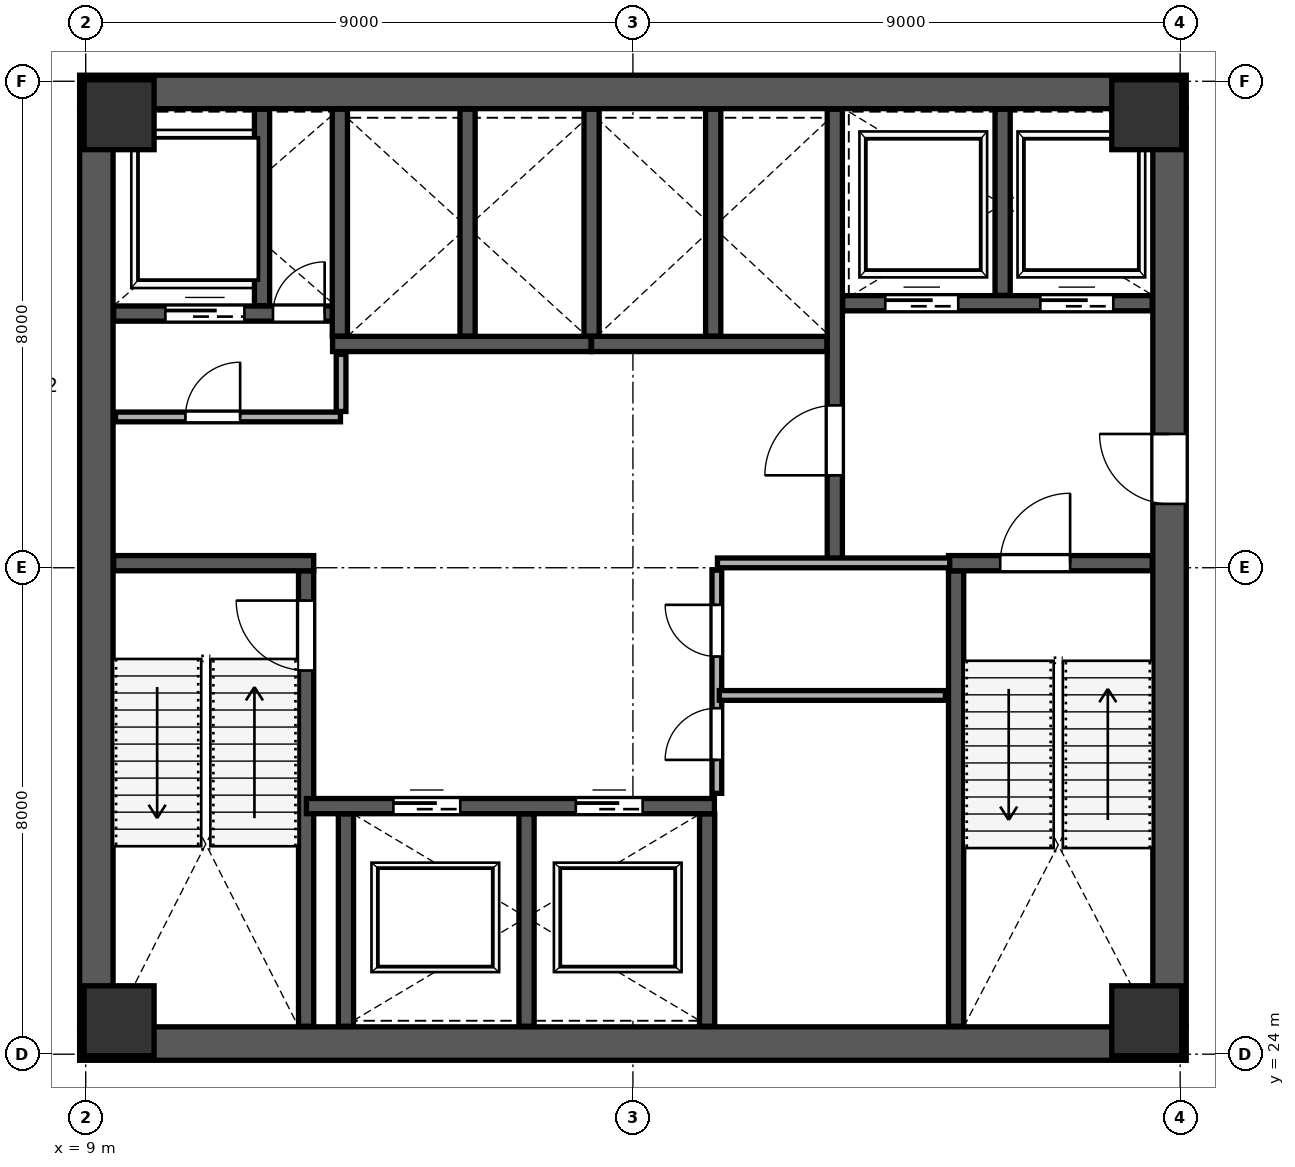
"""IFC4 building model, lengths in metres.
Left out: names, types, materials, properties, quantities, classifications, styles, units other than length and angle.
Written with IfcOpenShell. Run it as: python <this file> out.ifc"""

import sys

from ifc_helpers import new_model, si_unit, direction, frame, frame_2d, origin, origin_2d, place, context, subcontext, project, spatial, rectangle, extrude, source, transform, mapped, element, fill, save


model = new_model("IFC4")
c1 = context("Model", 3, precision=1e-05, world=origin(), true_north=direction((0.0, 1.0)))
c2 = subcontext(c1, "Body", "Model", "MODEL_VIEW")
j1 = project(units=[si_unit("LENGTHUNIT", "METRE"), si_unit("PLANEANGLEUNIT", "RADIAN")], contexts=[c1])
p1 = place(None, origin())
s1 = spatial("IfcSite", under=j1, at=p1, CompositionType="ELEMENT")
p2 = place(p1, origin())
s2 = spatial("IfcBuilding", under=s1, at=p2, CompositionType="ELEMENT")
p3 = place(p2, frame((0.0, 0.0, 104.2)))
s3 = spatial("IfcBuildingStorey", under=s2, at=p3, CompositionType="ELEMENT", Elevation=104.2)
m1 = source(origin(), c2, "Body", "SweptSolid", [
    extrude(rectangle(XDim=1.15, YDim=1.15, at=origin_2d()), origin(), (0.0, 0.0, 1.0), 4.198),
])
for number, where, z_axis, x_axis in (
    (1, (9.55, 24.55, 0.001), (0.0, 0.0, 1.0), (1.0, 0.0, 0.0)),
    (2, (26.45, 24.55, 0.001), (0.0, 0.0, 1.0), (1.0, 0.0, 0.0)),
    (3, (9.55, 39.45, 0.001), (0.0, 0.0, 1.0), (1.0, 0.0, 0.0)),
    (4, (26.45, 39.45, 0.001), (0.0, 0.0, 1.0), (1.0, 0.0, 0.0)),
):
    element("IfcColumn", number, at=place(p3, frame(where, z_axis=z_axis, x_axis=x_axis)), inside=s3, PredefinedType="COLUMN", context=c2, shape_type="MappedRepresentation", body=[
        mapped(m1, transform((0.0, 0.0, 0.0), scale=1.0)),
    ])
p4 = place(p3, frame((9.175, 24.45, 0.0), z_axis=(0.0, 0.0, 1.0), x_axis=(0.0, 1.0, 0.0)))
e5 = element("IfcWall", 5, at=p4, inside=s3, PredefinedType="SHEAR", context=c2, shape_type="SweptSolid", body=[
    extrude(rectangle(XDim=15.1, YDim=0.55, at=frame_2d((7.55, 0.0))), origin(), (0.0, 0.0, 1.0), 3.96),
])
p5 = place(p3, frame((26.825, 24.45, 0.0), z_axis=(0.0, 0.0, 1.0), x_axis=(0.0, 1.0, 0.0)))
e6 = element("IfcWall", 6, at=p5, inside=s3, PredefinedType="SHEAR", context=c2, shape_type="SweptSolid", body=[
    extrude(rectangle(XDim=15.1, YDim=0.55, at=frame_2d((7.55, 0.0))), origin(), (0.0, 0.0, 1.0), 3.96),
])
p6 = place(p5, frame((8.6, 0.0, 0.0)))
e7 = element("IfcOpeningElement", 7, at=p6, cuts=e6, PredefinedType="OPENING", context=c2, shape_type="SweptSolid", body=[
    extrude(rectangle(XDim=1.15, YDim=2.2, at=frame_2d((0.575, 1.1))), frame((0.0, 0.285, 0.0), z_axis=(0.0, -1.0, 0.0), x_axis=(1.0, 0.0, 0.0)), (0.0, 0.0, 1.0), 0.57),
])
for number, where, z_axis, x_axis in (
    (8, (8.9, 24.175, 0.0), (0.0, 0.0, 1.0), (1.0, 0.0, 0.0)),
    (9, (8.9, 39.825, 0.0), (0.0, 0.0, 1.0), (1.0, 0.0, 0.0)),
):
    element("IfcWall", number, at=place(p3, frame(where, z_axis=z_axis, x_axis=x_axis)), inside=s3, PredefinedType="SHEAR", context=c2, shape_type="SweptSolid", body=[
        extrude(rectangle(XDim=18.2, YDim=0.55, at=frame_2d((9.1, 0.0))), origin(), (0.0, 0.0, 1.0), 3.96),
    ])
p7 = place(p3, frame((12.625, 24.46, 0.0), z_axis=(0.0, 0.0, 1.0), x_axis=(0.0, 1.0, 0.0)))
e10 = element("IfcWall", 10, at=p7, inside=s3, PredefinedType="SHEAR", context=c2, shape_type="SweptSolid", body=[
    extrude(rectangle(XDim=7.49, YDim=0.25, at=frame_2d((3.745, 0.0))), origin(), (0.0, 0.0, 1.0), 3.96),
])
p8 = place(p7, frame((5.85, 0.0, 0.0)))
e11 = element("IfcOpeningElement", 11, at=p8, cuts=e10, PredefinedType="OPENING", context=c2, shape_type="SweptSolid", body=[
    extrude(rectangle(XDim=1.15, YDim=2.2, at=frame_2d((0.575, 1.1))), frame((0.0, 0.135, 0.0), z_axis=(0.0, -1.0, 0.0), x_axis=(1.0, 0.0, 0.0)), (0.0, 0.0, 1.0), 0.27),
])
p9 = place(p3, frame((9.46, 32.075, 0.0), z_axis=(0.0, 0.0, 1.0), x_axis=(1.0, 0.0, 0.0)))
e12 = element("IfcWall", 12, at=p9, inside=s3, PredefinedType="SHEAR", context=c2, shape_type="SweptSolid", body=[
    extrude(rectangle(XDim=3.29, YDim=0.25, at=frame_2d((1.645, 0.0))), origin(), (0.0, 0.0, 1.0), 3.96),
])
p10 = place(p3, frame((23.315, 24.46, 0.0), z_axis=(0.0, 0.0, 1.0), x_axis=(0.0, 1.0, 0.0)))
e13 = element("IfcWall", 13, at=p10, inside=s3, PredefinedType="SHEAR", context=c2, shape_type="SweptSolid", body=[
    extrude(rectangle(XDim=7.49, YDim=0.25, at=frame_2d((3.745, 0.0))), origin(), (0.0, 0.0, 1.0), 3.96),
])
p11 = place(p3, frame((23.19, 32.075, 0.0), z_axis=(0.0, 0.0, 1.0), x_axis=(1.0, 0.0, 0.0)))
e14 = element("IfcWall", 14, at=p11, inside=s3, PredefinedType="SHEAR", context=c2, shape_type="SweptSolid", body=[
    extrude(rectangle(XDim=3.35, YDim=0.25, at=frame_2d((1.675, 0.0))), origin(), (0.0, 0.0, 1.0), 3.96),
])
p12 = place(p11, frame((0.85, 0.0, 0.0)))
e15 = element("IfcOpeningElement", 15, at=p12, cuts=e14, PredefinedType="OPENING", context=c2, shape_type="SweptSolid", body=[
    extrude(rectangle(XDim=1.15, YDim=2.2, at=frame_2d((0.575, 1.1))), frame((0.0, 0.135, 0.0), z_axis=(0.0, -1.0, 0.0), x_axis=(1.0, 0.0, 0.0)), (0.0, 0.0, 1.0), 0.27),
])
p13 = place(p3, frame((21.32, 32.12, 0.0), z_axis=(0.0, 0.0, 1.0), x_axis=(0.0, 1.0, 0.0)))
e16 = element("IfcWall", 16, at=p13, inside=s3, PredefinedType="SHEAR", context=c2, shape_type="SweptSolid", body=[
    extrude(rectangle(XDim=7.42, YDim=0.25, at=frame_2d((3.71, 0.0))), origin(), (0.0, 0.0, 1.0), 3.96),
])
p14 = place(p13, frame((1.4, 0.0, 0.0)))
e17 = element("IfcOpeningElement", 17, at=p14, cuts=e16, PredefinedType="OPENING", context=c2, shape_type="SweptSolid", body=[
    extrude(rectangle(XDim=1.15, YDim=2.2, at=frame_2d((0.575, 1.1))), frame((0.0, 0.135, 0.0), z_axis=(0.0, -1.0, 0.0), x_axis=(1.0, 0.0, 0.0)), (0.0, 0.0, 1.0), 0.27),
])
p15 = place(p3, frame((9.46, 36.18, 0.0), z_axis=(0.0, 0.0, 1.0), x_axis=(1.0, 0.0, 0.0)))
e18 = element("IfcWall", 18, at=p15, inside=s3, PredefinedType="SHEAR", context=c2, shape_type="SweptSolid", body=[
    extrude(rectangle(XDim=3.79, YDim=0.25, at=frame_2d((1.895, 0.0))), origin(), (0.0, 0.0, 1.0), 3.96),
])
p16 = place(p15, frame((2.62, 0.0, 0.0)))
e19 = element("IfcOpeningElement", 19, at=p16, cuts=e18, PredefinedType="OPENING", context=c2, shape_type="SweptSolid", body=[
    extrude(rectangle(XDim=0.85, YDim=2.1, at=frame_2d((0.425, 1.05))), frame((0.0, 0.135, 0.0), z_axis=(0.0, -1.0, 0.0), x_axis=(1.0, 0.0, 0.0)), (0.0, 0.0, 1.0), 0.27),
])
p17 = place(p15, frame((0.85, 0.0, 0.0)))
e20 = element("IfcOpeningElement", 20, at=p17, cuts=e18, PredefinedType="OPENING", context=c2, shape_type="SweptSolid", body=[
    extrude(rectangle(XDim=1.3, YDim=2.25, at=frame_2d((0.65, 1.125))), frame((0.0, 0.135, 0.0), z_axis=(0.0, -1.0, 0.0), x_axis=(1.0, 0.0, 0.0)), (0.0, 0.0, 1.0), 0.27),
])
p18 = place(p3, frame((11.9, 36.31, 0.0), z_axis=(0.0, 0.0, 1.0), x_axis=(0.0, 1.0, 0.0)))
e21 = element("IfcWall", 21, at=p18, inside=s3, PredefinedType="SHEAR", context=c2, shape_type="SweptSolid", body=[
    extrude(rectangle(XDim=3.23, YDim=0.25, at=frame_2d((1.615, 0.0))), origin(), (0.0, 0.0, 1.0), 3.96),
])
p19 = place(p3, frame((21.45, 36.35, 0.0), z_axis=(0.0, 0.0, 1.0), x_axis=(1.0, 0.0, 0.0)))
e22 = element("IfcWall", 22, at=p19, inside=s3, PredefinedType="SHEAR", context=c2, shape_type="SweptSolid", body=[
    extrude(rectangle(XDim=5.09, YDim=0.25, at=frame_2d((2.545, 0.0))), origin(), (0.0, 0.0, 1.0), 3.96),
])
p20 = place(p19, frame((0.7, 0.0, 0.0)))
e23 = element("IfcOpeningElement", 23, at=p20, cuts=e22, PredefinedType="OPENING", context=c2, shape_type="SweptSolid", body=[
    extrude(rectangle(XDim=1.2, YDim=2.2, at=frame_2d((0.6, 1.1))), frame((0.0, 0.135, 0.0), z_axis=(0.0, -1.0, 0.0), x_axis=(1.0, 0.0, 0.0)), (0.0, 0.0, 1.0), 0.27),
])
p21 = place(p19, frame((3.25, 0.0, 0.0)))
e24 = element("IfcOpeningElement", 24, at=p21, cuts=e22, PredefinedType="OPENING", context=c2, shape_type="SweptSolid", body=[
    extrude(rectangle(XDim=1.2, YDim=2.2, at=frame_2d((0.6, 1.1))), frame((0.0, 0.135, 0.0), z_axis=(0.0, -1.0, 0.0), x_axis=(1.0, 0.0, 0.0)), (0.0, 0.0, 1.0), 0.27),
])
p22 = place(p3, frame((24.08, 36.48, 0.0), z_axis=(0.0, 0.0, 1.0), x_axis=(0.0, 1.0, 0.0)))
e25 = element("IfcWall", 25, at=p22, inside=s3, PredefinedType="SHEAR", context=c2, shape_type="SweptSolid", body=[
    extrude(rectangle(XDim=3.06, YDim=0.25, at=frame_2d((1.53, 0.0))), origin(), (0.0, 0.0, 1.0), 3.96),
])
p23 = place(p3, frame((12.63, 28.08, 0.0), z_axis=(0.0, 0.0, 1.0), x_axis=(1.0, 0.0, 0.0)))
e26 = element("IfcWall", 26, at=p23, inside=s3, PredefinedType="SHEAR", context=c2, shape_type="SweptSolid", body=[
    extrude(rectangle(XDim=6.71, YDim=0.25, at=frame_2d((3.355, 0.0))), origin(), (0.0, 0.0, 1.0), 3.96),
])
p24 = place(p23, frame((1.43, 0.0, 0.0)))
e27 = element("IfcOpeningElement", 27, at=p24, cuts=e26, PredefinedType="OPENING", context=c2, shape_type="SweptSolid", body=[
    extrude(rectangle(XDim=1.1, YDim=2.2, at=frame_2d((0.55, 1.1))), frame((0.0, 0.135, 0.0), z_axis=(0.0, -1.0, 0.0), x_axis=(1.0, 0.0, 0.0)), (0.0, 0.0, 1.0), 0.27),
])
p25 = place(p23, frame((4.43, 0.0, 0.0)))
e28 = element("IfcOpeningElement", 28, at=p25, cuts=e26, PredefinedType="OPENING", context=c2, shape_type="SweptSolid", body=[
    extrude(rectangle(XDim=1.1, YDim=2.2, at=frame_2d((0.55, 1.1))), frame((0.0, 0.135, 0.0), z_axis=(0.0, -1.0, 0.0), x_axis=(1.0, 0.0, 0.0)), (0.0, 0.0, 1.0), 0.27),
])
for number, where, z_axis, x_axis in (
    (29, (13.28, 24.46, 0.0), (0.0, 0.0, 1.0), (0.0, 1.0, 0.0)),
    (30, (16.25, 24.46, 0.0), (0.0, 0.0, 1.0), (0.0, 1.0, 0.0)),
    (31, (19.22, 24.46, 0.0), (0.0, 0.0, 1.0), (0.0, 1.0, 0.0)),
):
    element("IfcWall", number, at=place(p3, frame(where, z_axis=z_axis, x_axis=x_axis)), inside=s3, PredefinedType="SHEAR", context=c2, shape_type="SweptSolid", body=[
        extrude(rectangle(XDim=3.49, YDim=0.25, at=frame_2d((1.745, 0.0))), origin(), (0.0, 0.0, 1.0), 3.96),
    ])
p26 = place(p3, frame((13.06, 35.68, 0.0), z_axis=(0.0, 0.0, 1.0), x_axis=(1.0, 0.0, 0.0)))
e32 = element("IfcWall", 32, at=p26, inside=s3, PredefinedType="SHEAR", context=c2, shape_type="SweptSolid", body=[
    extrude(rectangle(XDim=4.25, YDim=0.25, at=frame_2d((2.125, 0.0))), origin(), (0.0, 0.0, 1.0), 3.96),
])
for number, where, z_axis, x_axis in (
    (33, (13.18, 35.81, 0.0), (0.0, 0.0, 1.0), (0.0, 1.0, 0.0)),
    (34, (15.28, 35.81, 0.0), (0.0, 0.0, 1.0), (0.0, 1.0, 0.0)),
):
    element("IfcWall", number, at=place(p3, frame(where, z_axis=z_axis, x_axis=x_axis)), inside=s3, PredefinedType="SHEAR", context=c2, shape_type="SweptSolid", body=[
        extrude(rectangle(XDim=3.73, YDim=0.25, at=frame_2d((1.865, 0.0))), origin(), (0.0, 0.0, 1.0), 3.96),
    ])
p27 = place(p3, frame((17.32, 35.68, 0.0), z_axis=(0.0, 0.0, 1.0), x_axis=(1.0, 0.0, 0.0)))
e35 = element("IfcWall", 35, at=p27, inside=s3, PredefinedType="SHEAR", context=c2, shape_type="SweptSolid", body=[
    extrude(rectangle(XDim=3.87, YDim=0.25, at=frame_2d((1.935, 0.0))), origin(), (0.0, 0.0, 1.0), 3.96),
])
for number, where, z_axis, x_axis in (
    (36, (17.32, 35.81, 0.0), (0.0, 0.0, 1.0), (0.0, 1.0, 0.0)),
    (37, (19.32, 35.81, 0.0), (0.0, 0.0, 1.0), (0.0, 1.0, 0.0)),
):
    element("IfcWall", number, at=place(p3, frame(where, z_axis=z_axis, x_axis=x_axis)), inside=s3, PredefinedType="SHEAR", context=c2, shape_type="SweptSolid", body=[
        extrude(rectangle(XDim=3.73, YDim=0.25, at=frame_2d((1.865, 0.0))), origin(), (0.0, 0.0, 1.0), 3.96),
    ])
p28 = place(p3, frame((9.49, 34.48, 0.0), z_axis=(0.0, 0.0, 1.0), x_axis=(1.0, 0.0, 0.0)))
e38 = element("IfcWall", 38, at=p28, inside=s3, PredefinedType="PARTITIONING", context=c2, shape_type="SweptSolid", body=[
    extrude(rectangle(XDim=3.7, YDim=0.16, at=frame_2d((1.85, 0.0))), origin(), (0.0, 0.0, 1.0), 3.96),
])
p29 = place(p28, frame((1.15, 0.0, 0.0)))
e39 = element("IfcOpeningElement", 39, at=p29, cuts=e38, PredefinedType="OPENING", context=c2, shape_type="SweptSolid", body=[
    extrude(rectangle(XDim=0.9, YDim=2.15, at=frame_2d((0.45, 1.075))), frame((0.0, 0.09, 0.0), z_axis=(0.0, -1.0, 0.0), x_axis=(1.0, 0.0, 0.0)), (0.0, 0.0, 1.0), 0.18),
])
p30 = place(p3, frame((13.2, 34.57, 0.0), z_axis=(0.0, 0.0, 1.0), x_axis=(0.0, 1.0, 0.0)))
e40 = element("IfcWall", 40, at=p30, inside=s3, PredefinedType="PARTITIONING", context=c2, shape_type="SweptSolid", body=[
    extrude(rectangle(XDim=0.94, YDim=0.16, at=frame_2d((0.47, 0.0))), origin(), (0.0, 0.0, 1.0), 3.96),
])
p31 = place(p3, frame((19.39, 32.08, 0.0), z_axis=(0.0, 0.0, 1.0), x_axis=(1.0, 0.0, 0.0)))
e41 = element("IfcWall", 41, at=p31, inside=s3, PredefinedType="PARTITIONING", context=c2, shape_type="SweptSolid", body=[
    extrude(rectangle(XDim=3.82, YDim=0.16, at=frame_2d((1.91, 0.0))), origin(), (0.0, 0.0, 1.0), 3.96),
])
p32 = place(p3, frame((19.38, 28.29, 0.0), z_axis=(0.0, 0.0, 1.0), x_axis=(0.0, 1.0, 0.0)))
e42 = element("IfcWall", 42, at=p32, inside=s3, PredefinedType="PARTITIONING", context=c2, shape_type="SweptSolid", body=[
    extrude(rectangle(XDim=3.67, YDim=0.16, at=frame_2d((1.835, 0.0))), origin(), (0.0, 0.0, 1.0), 3.96),
])
p33 = place(p32, frame((0.55, 0.0, 0.0)))
e43 = element("IfcOpeningElement", 43, at=p33, cuts=e42, PredefinedType="OPENING", context=c2, shape_type="SweptSolid", body=[
    extrude(rectangle(XDim=0.85, YDim=2.1, at=frame_2d((0.425, 1.05))), frame((0.0, 0.09, 0.0), z_axis=(0.0, -1.0, 0.0), x_axis=(1.0, 0.0, 0.0)), (0.0, 0.0, 1.0), 0.18),
])
p34 = place(p32, frame((2.25, 0.0, 0.0)))
e44 = element("IfcOpeningElement", 44, at=p34, cuts=e42, PredefinedType="OPENING", context=c2, shape_type="SweptSolid", body=[
    extrude(rectangle(XDim=0.85, YDim=2.1, at=frame_2d((0.425, 1.05))), frame((0.0, 0.09, 0.0), z_axis=(0.0, -1.0, 0.0), x_axis=(1.0, 0.0, 0.0)), (0.0, 0.0, 1.0), 0.18),
])
p35 = place(p3, frame((19.42, 29.9, 0.0), z_axis=(0.0, 0.0, 1.0), x_axis=(1.0, 0.0, 0.0)))
e45 = element("IfcWall", 45, at=p35, inside=s3, PredefinedType="PARTITIONING", context=c2, shape_type="SweptSolid", body=[
    extrude(rectangle(XDim=3.72, YDim=0.16, at=frame_2d((1.86, 0.0))), origin(), (0.0, 0.0, 1.0), 3.96),
])
p36 = place(p3, frame((8.071, 46.831, 0.0), z_axis=(0.0, 0.0, 1.0), x_axis=(0.965925848141, -0.258818963551, 0.0)))
e46 = element("IfcWall", 46, at=p36, inside=s3, PredefinedType="PARTITIONING", context=c2, shape_type="SweptSolid", body=[
    extrude(rectangle(XDim=26.16, YDim=0.115, at=frame_2d((13.08, 0.0))), origin(), (0.0, 0.0, 1.0), 3.96),
])
p37 = place(p36, frame((1.05, 0.0, 0.0)))
e47 = element("IfcOpeningElement", 47, at=p37, cuts=e46, PredefinedType="OPENING", context=c2, shape_type="SweptSolid", body=[
    extrude(rectangle(XDim=0.95, YDim=2.15, at=frame_2d((0.475, 1.075))), frame((0.0, 0.067, 0.0), z_axis=(0.0, -1.0, 0.0), x_axis=(1.0, 0.0, 0.0)), (0.0, 0.0, 1.0), 0.135),
])
p38 = place(p3, frame((25.906, 12.164, 0.0), z_axis=(0.0, 0.0, 1.0), x_axis=(0.258805595447, 0.965929430013, 0.0)))
e48 = element("IfcWall", 48, at=p38, inside=s3, PredefinedType="PARTITIONING", context=c2, shape_type="SweptSolid", body=[
    extrude(rectangle(XDim=19.78, YDim=0.16, at=frame_2d((9.89, 0.0))), origin(), (0.0, 0.0, 1.0), 3.96),
])
m2 = source(origin(), c2, "Body", "SweptSolid", [
    extrude(rectangle(XDim=1.15, YDim=2.2, at=frame_2d((0.575, 1.1))), frame((0.0, 0.025, 0.0), z_axis=(0.0, -1.0, 0.0), x_axis=(1.0, 0.0, 0.0)), (0.0, 0.0, 1.0), 0.05),
])
p39 = place(p8, origin())
e49 = element("IfcDoor", 49, at=p39, inside=s3, OperationType="SINGLE_SWING_RIGHT", PredefinedType="DOOR", context=c2, shape_type="MappedRepresentation", body=[
    mapped(m2, transform((0.0, 0.0, 0.0), scale=1.0)),
])
fill(e11, e49)
m3 = source(origin(), c2, "Body", "SweptSolid", [
    extrude(rectangle(XDim=1.15, YDim=2.2, at=frame_2d((0.575, 1.1))), frame((0.0, 0.025, 0.0), z_axis=(0.0, -1.0, 0.0), x_axis=(1.0, 0.0, 0.0)), (0.0, 0.0, 1.0), 0.05),
])
p40 = place(p14, origin())
e50 = element("IfcDoor", 50, at=p40, inside=s3, OperationType="SINGLE_SWING_LEFT", PredefinedType="DOOR", context=c2, shape_type="MappedRepresentation", body=[
    mapped(m3, transform((0.0, 0.0, 0.0), scale=1.0)),
])
fill(e17, e50)
p41 = place(p12, origin())
e51 = element("IfcDoor", 51, at=p41, inside=s3, OperationType="SINGLE_SWING_RIGHT", PredefinedType="DOOR", context=c2, shape_type="MappedRepresentation", body=[
    mapped(m2, transform((0.0, 0.0, 0.0), scale=1.0)),
])
fill(e15, e51)
p42 = place(p6, origin())
e52 = element("IfcDoor", 52, at=p42, inside=s3, OperationType="SINGLE_SWING_RIGHT", PredefinedType="DOOR", context=c2, shape_type="MappedRepresentation", body=[
    mapped(m3, transform((0.0, 0.0, 0.0), scale=1.0)),
])
fill(e7, e52)
m4 = source(origin(), c2, "Body", "SweptSolid", [
    extrude(rectangle(XDim=0.85, YDim=2.1, at=frame_2d((0.425, 1.05))), frame((0.0, 0.025, 0.0), z_axis=(0.0, -1.0, 0.0), x_axis=(1.0, 0.0, 0.0)), (0.0, 0.0, 1.0), 0.05),
])
p43 = place(p16, origin())
e53 = element("IfcDoor", 53, at=p43, inside=s3, OperationType="SINGLE_SWING_RIGHT", PredefinedType="DOOR", context=c2, shape_type="MappedRepresentation", body=[
    mapped(m4, transform((0.0, 0.0, 0.0), scale=1.0)),
])
fill(e19, e53)
m5 = source(origin(), c2, "Body", "SweptSolid", [
    extrude(rectangle(XDim=1.1, YDim=2.2, at=frame_2d((0.55, 1.1))), frame((0.0, 0.025, 0.0), z_axis=(0.0, -1.0, 0.0), x_axis=(1.0, 0.0, 0.0)), (0.0, 0.0, 1.0), 0.05),
])
p44 = place(p24, origin())
e54 = element("IfcDoor", 54, at=p44, inside=s3, OperationType="SLIDING_TO_LEFT", PredefinedType="DOOR", context=c2, shape_type="MappedRepresentation", body=[
    mapped(m5, transform((0.0, 0.0, 0.0), scale=1.0)),
])
fill(e27, e54)
p45 = place(p25, origin())
e55 = element("IfcDoor", 55, at=p45, inside=s3, OperationType="SLIDING_TO_RIGHT", PredefinedType="DOOR", context=c2, shape_type="MappedRepresentation", body=[
    mapped(m5, transform((0.0, 0.0, 0.0), scale=1.0)),
])
fill(e28, e55)
m6 = source(origin(), c2, "Body", "SweptSolid", [
    extrude(rectangle(XDim=1.2, YDim=2.2, at=frame_2d((0.6, 1.1))), frame((0.0, 0.025, 0.0), z_axis=(0.0, -1.0, 0.0), x_axis=(1.0, 0.0, 0.0)), (0.0, 0.0, 1.0), 0.05),
])
p46 = place(p20, origin())
e56 = element("IfcDoor", 56, at=p46, inside=s3, OperationType="SLIDING_TO_LEFT", PredefinedType="DOOR", context=c2, shape_type="MappedRepresentation", body=[
    mapped(m6, transform((0.0, 0.0, 0.0), scale=1.0)),
])
fill(e23, e56)
p47 = place(p21, origin())
e57 = element("IfcDoor", 57, at=p47, inside=s3, OperationType="SLIDING_TO_RIGHT", PredefinedType="DOOR", context=c2, shape_type="MappedRepresentation", body=[
    mapped(m6, transform((0.0, 0.0, 0.0), scale=1.0)),
])
fill(e24, e57)
m7 = source(origin(), c2, "Body", "SweptSolid", [
    extrude(rectangle(XDim=1.3, YDim=2.25, at=frame_2d((0.65, 1.125))), frame((0.0, 0.025, 0.0), z_axis=(0.0, -1.0, 0.0), x_axis=(1.0, 0.0, 0.0)), (0.0, 0.0, 1.0), 0.05),
])
p48 = place(p17, origin())
e58 = element("IfcDoor", 58, at=p48, inside=s3, OperationType="SLIDING_TO_LEFT", PredefinedType="DOOR", context=c2, shape_type="MappedRepresentation", body=[
    mapped(m7, transform((0.0, 0.0, 0.0), scale=1.0)),
])
fill(e20, e58)
m8 = source(origin(), c2, "Body", "SweptSolid", [
    extrude(rectangle(XDim=0.9, YDim=2.15, at=frame_2d((0.45, 1.075))), frame((0.0, 0.025, 0.0), z_axis=(0.0, -1.0, 0.0), x_axis=(1.0, 0.0, 0.0)), (0.0, 0.0, 1.0), 0.05),
])
p49 = place(p29, origin())
e59 = element("IfcDoor", 59, at=p49, inside=s3, OperationType="SINGLE_SWING_RIGHT", PredefinedType="DOOR", context=c2, shape_type="MappedRepresentation", body=[
    mapped(m8, transform((0.0, 0.0, 0.0), scale=1.0)),
])
fill(e39, e59)
p50 = place(p33, origin())
e60 = element("IfcDoor", 60, at=p50, inside=s3, OperationType="SINGLE_SWING_LEFT", PredefinedType="DOOR", context=c2, shape_type="MappedRepresentation", body=[
    mapped(m4, transform((0.0, 0.0, 0.0), scale=1.0)),
])
fill(e43, e60)
p51 = place(p34, origin())
e61 = element("IfcDoor", 61, at=p51, inside=s3, OperationType="SINGLE_SWING_RIGHT", PredefinedType="DOOR", context=c2, shape_type="MappedRepresentation", body=[
    mapped(m4, transform((0.0, 0.0, 0.0), scale=1.0)),
])
fill(e44, e61)
save(model, sys.argv[1])
